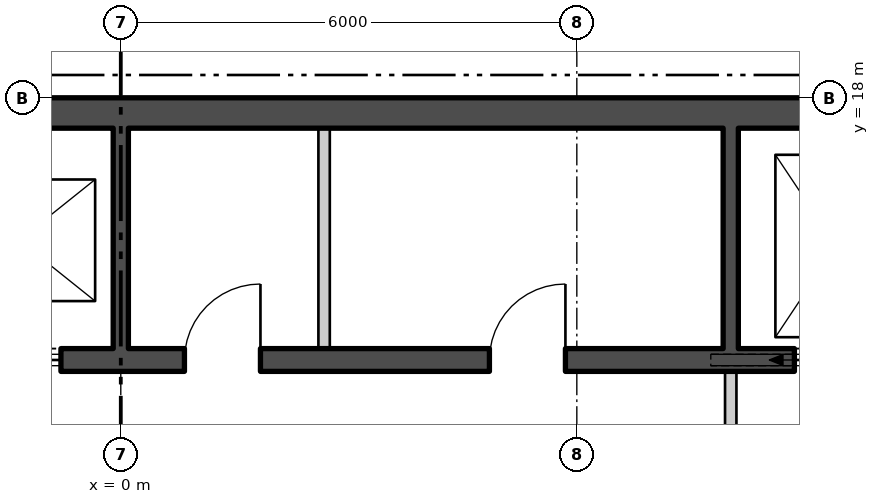
"""IFC4 building model, lengths in metres.
Left out: names, types, materials, properties, quantities, classifications, styles, units other than length and angle.
Written with IfcOpenShell. Run it as: python <this file> out.ifc"""

import sys

from ifc_helpers import new_model, si_unit, direction, frame, frame_2d, origin, place, context, subcontext, project, spatial, polyline, rectangle, outline, extrude, element, fill, save


model = new_model("IFC4")
c1 = context("Model", 3, precision=1e-05, world=origin(), true_north=direction((0.0, 1.0)))
c2 = subcontext(c1, "Body", "Model", "MODEL_VIEW")
j1 = project(units=[si_unit("LENGTHUNIT", "METRE"), si_unit("PLANEANGLEUNIT", "RADIAN")], contexts=[c1])
p1 = place(None, origin())
s1 = spatial("IfcSite", under=j1, at=p1, CompositionType="ELEMENT")
p2 = place(p1, origin())
s2 = spatial("IfcBuilding", under=s1, at=p2, CompositionType="ELEMENT")
p3 = place(p2, frame((0.0, 0.0, 257.1)))
s3 = spatial("IfcBuildingStorey", under=s2, at=p3, CompositionType="ELEMENT", Elevation=257.1)
p4 = place(p3, frame((2.825, -24.522, -0.18), z_axis=(0.0, 0.0, 1.0), x_axis=(0.500000141277, 0.866025322218, 0.0)))
e1 = element("IfcWall", 1, at=p4, inside=s3, PredefinedType="SOLIDWALL", context=c2, shape_type="SweptSolid", body=[
    extrude(outline(polyline([(-0.13, -0.225), (45.86, -0.225), (45.6, 0.225), (0.13, 0.225), (-0.13, -0.225)])), origin(), (0.0, 0.0, 1.0), 3.68),
])
p5 = place(p4, frame((1.424, 0.0, 1.08)))
e2 = element("IfcOpeningElement", 2, at=p5, cuts=e1, PredefinedType="OPENING", context=c2, shape_type="SweptSolid", body=[
    extrude(rectangle(XDim=2.4, YDim=2.0, at=frame_2d((1.2, 1.0))), frame((0.0, 0.235, 0.0), z_axis=(0.0, -1.0, 0.0), x_axis=(1.0, 0.0, 0.0)), (0.0, 0.0, 1.0), 0.47),
])
p6 = place(p4, frame((5.892, 0.0, 1.08)))
e3 = element("IfcOpeningElement", 3, at=p6, cuts=e1, PredefinedType="OPENING", context=c2, shape_type="SweptSolid", body=[
    extrude(rectangle(XDim=2.4, YDim=2.0, at=frame_2d((1.2, 1.0))), frame((0.0, 0.235, 0.0), z_axis=(0.0, -1.0, 0.0), x_axis=(1.0, 0.0, 0.0)), (0.0, 0.0, 1.0), 0.47),
])
p7 = place(p4, frame((10.399, 0.0, 1.08)))
e4 = element("IfcOpeningElement", 4, at=p7, cuts=e1, PredefinedType="OPENING", context=c2, shape_type="SweptSolid", body=[
    extrude(rectangle(XDim=2.4, YDim=2.0, at=frame_2d((1.2, 1.0))), frame((0.0, 0.235, 0.0), z_axis=(0.0, -1.0, 0.0), x_axis=(1.0, 0.0, 0.0)), (0.0, 0.0, 1.0), 0.47),
])
p8 = place(p4, frame((14.905, 0.0, 1.08)))
e5 = element("IfcOpeningElement", 5, at=p8, cuts=e1, PredefinedType="OPENING", context=c2, shape_type="SweptSolid", body=[
    extrude(rectangle(XDim=2.4, YDim=2.0, at=frame_2d((1.2, 1.0))), frame((0.0, 0.235, 0.0), z_axis=(0.0, -1.0, 0.0), x_axis=(1.0, 0.0, 0.0)), (0.0, 0.0, 1.0), 0.47),
])
p9 = place(p4, frame((19.412, 0.0, 1.08)))
e6 = element("IfcOpeningElement", 6, at=p9, cuts=e1, PredefinedType="OPENING", context=c2, shape_type="SweptSolid", body=[
    extrude(rectangle(XDim=2.4, YDim=2.0, at=frame_2d((1.2, 1.0))), frame((0.0, 0.235, 0.0), z_axis=(0.0, -1.0, 0.0), x_axis=(1.0, 0.0, 0.0)), (0.0, 0.0, 1.0), 0.47),
])
p10 = place(p4, frame((28.425, 0.0, 1.08)))
e7 = element("IfcOpeningElement", 7, at=p10, cuts=e1, PredefinedType="OPENING", context=c2, shape_type="SweptSolid", body=[
    extrude(rectangle(XDim=2.4, YDim=2.0, at=frame_2d((1.2, 1.0))), frame((0.0, 0.235, 0.0), z_axis=(0.0, -1.0, 0.0), x_axis=(1.0, 0.0, 0.0)), (0.0, 0.0, 1.0), 0.47),
])
p11 = place(p4, frame((37.438, 0.0, 1.08)))
e8 = element("IfcOpeningElement", 8, at=p11, cuts=e1, PredefinedType="OPENING", context=c2, shape_type="SweptSolid", body=[
    extrude(rectangle(XDim=2.4, YDim=2.0, at=frame_2d((1.2, 1.0))), frame((0.0, 0.235, 0.0), z_axis=(0.0, -1.0, 0.0), x_axis=(1.0, 0.0, 0.0)), (0.0, 0.0, 1.0), 0.47),
])
p12 = place(p4, frame((41.907, 0.0, 1.08)))
e9 = element("IfcOpeningElement", 9, at=p12, cuts=e1, PredefinedType="OPENING", context=c2, shape_type="SweptSolid", body=[
    extrude(rectangle(XDim=2.4, YDim=2.0, at=frame_2d((1.2, 1.0))), frame((0.0, 0.235, 0.0), z_axis=(0.0, -1.0, 0.0), x_axis=(1.0, 0.0, 0.0)), (0.0, 0.0, 1.0), 0.47),
])
p13 = place(p3, frame((-14.5, 17.8, 0.0), z_axis=(0.0, 0.0, 1.0), x_axis=(1.0, 0.0, 0.0)))
e10 = element("IfcWall", 10, at=p13, inside=s3, PredefinedType="SHEAR", context=c2, shape_type="SweptSolid", body=[
    extrude(rectangle(XDim=29.0, YDim=0.4, at=frame_2d((14.5, 0.0))), origin(), (0.0, 0.0, 1.0), 3.7),
])
p14 = place(p3, frame((-10.7, 14.55, 0.0), z_axis=(0.0, 0.0, 1.0), x_axis=(1.0, 0.0, 0.0)))
e11 = element("IfcWall", 11, at=p14, inside=s3, PredefinedType="SHEAR", context=c2, shape_type="SweptSolid", body=[
    extrude(rectangle(XDim=21.4, YDim=0.3, at=frame_2d((10.7, 0.0))), origin(), (0.0, 0.0, 1.0), 3.7),
])
p15 = place(p14, frame((0.738, 0.0, 0.0)))
e12 = element("IfcOpeningElement", 12, at=p15, cuts=e11, PredefinedType="OPENING", context=c2, shape_type="SweptSolid", body=[
    extrude(rectangle(XDim=1.1, YDim=2.1, at=frame_2d((0.55, 1.05))), frame((0.0, 0.16, 0.0), z_axis=(0.0, -1.0, 0.0), x_axis=(1.0, 0.0, 0.0)), (0.0, 0.0, 1.0), 0.32),
])
p16 = place(p14, frame((3.462, 0.0, 0.0)))
e13 = element("IfcOpeningElement", 13, at=p16, cuts=e11, PredefinedType="OPENING", context=c2, shape_type="SweptSolid", body=[
    extrude(rectangle(XDim=1.1, YDim=2.1, at=frame_2d((0.55, 1.05))), frame((0.0, 0.16, 0.0), z_axis=(0.0, -1.0, 0.0), x_axis=(1.0, 0.0, 0.0)), (0.0, 0.0, 1.0), 0.32),
])
p17 = place(p14, frame((6.138, 0.0, 0.0)))
e14 = element("IfcOpeningElement", 14, at=p17, cuts=e11, PredefinedType="OPENING", context=c2, shape_type="SweptSolid", body=[
    extrude(rectangle(XDim=1.1, YDim=2.1, at=frame_2d((0.55, 1.05))), frame((0.0, 0.16, 0.0), z_axis=(0.0, -1.0, 0.0), x_axis=(1.0, 0.0, 0.0)), (0.0, 0.0, 1.0), 0.32),
])
p18 = place(p14, frame((8.812, 0.0, 0.0)))
e15 = element("IfcOpeningElement", 15, at=p18, cuts=e11, PredefinedType="OPENING", context=c2, shape_type="SweptSolid", body=[
    extrude(rectangle(XDim=1.1, YDim=2.1, at=frame_2d((0.55, 1.05))), frame((0.0, 0.16, 0.0), z_axis=(0.0, -1.0, 0.0), x_axis=(1.0, 0.0, 0.0)), (0.0, 0.0, 1.0), 0.32),
])
p19 = place(p14, frame((19.562, 0.0, 0.0)))
e16 = element("IfcOpeningElement", 16, at=p19, cuts=e11, PredefinedType="OPENING", context=c2, shape_type="SweptSolid", body=[
    extrude(rectangle(XDim=1.1, YDim=2.1, at=frame_2d((0.55, 1.05))), frame((0.0, 0.16, 0.0), z_axis=(0.0, -1.0, 0.0), x_axis=(1.0, 0.0, 0.0)), (0.0, 0.0, 1.0), 0.32),
])
p20 = place(p14, frame((11.537, 0.0, 0.0)))
e17 = element("IfcOpeningElement", 17, at=p20, cuts=e11, PredefinedType="OPENING", context=c2, shape_type="SweptSolid", body=[
    extrude(rectangle(XDim=1.0, YDim=2.1, at=frame_2d((0.5, 1.05))), frame((0.0, 0.16, 0.0), z_axis=(0.0, -1.0, 0.0), x_axis=(1.0, 0.0, 0.0)), (0.0, 0.0, 1.0), 0.32),
])
p21 = place(p14, frame((15.55, 0.0, 0.0)))
e18 = element("IfcOpeningElement", 18, at=p21, cuts=e11, PredefinedType="OPENING", context=c2, shape_type="SweptSolid", body=[
    extrude(rectangle(XDim=1.0, YDim=2.1, at=frame_2d((0.5, 1.05))), frame((0.0, 0.16, 0.0), z_axis=(0.0, -1.0, 0.0), x_axis=(1.0, 0.0, 0.0)), (0.0, 0.0, 1.0), 0.32),
])
p22 = place(p3, frame((0.0, 14.7, 0.0), z_axis=(0.0, 0.0, 1.0), x_axis=(0.0, 1.0, 0.0)))
e19 = element("IfcWall", 19, at=p22, inside=s3, PredefinedType="SHEAR", context=c2, shape_type="SweptSolid", body=[
    extrude(rectangle(XDim=2.9, YDim=0.2, at=frame_2d((1.45, 0.0))), origin(), (0.0, 0.0, 1.0), 3.7),
])
p23 = place(p3, frame((2.675, 14.7, 0.0), z_axis=(0.0, 0.0, 1.0), x_axis=(0.0, 1.0, 0.0)))
e20 = element("IfcWall", 20, at=p23, inside=s3, PredefinedType="PARTITIONING", context=c2, shape_type="SweptSolid", body=[
    extrude(rectangle(XDim=2.9, YDim=0.15, at=frame_2d((1.45, 0.0))), origin(), (0.0, 0.0, 1.0), 3.7),
])
p24 = place(p3, frame((8.025, 14.7, 0.0), z_axis=(0.0, 0.0, 1.0), x_axis=(0.0, 1.0, 0.0)))
e21 = element("IfcWall", 21, at=p24, inside=s3, PredefinedType="SHEAR", context=c2, shape_type="SweptSolid", body=[
    extrude(rectangle(XDim=2.9, YDim=0.2, at=frame_2d((1.45, 0.0))), origin(), (0.0, 0.0, 1.0), 3.7),
])
p25 = place(p3, frame((8.025, 10.8, 0.0), z_axis=(0.0, 0.0, 1.0), x_axis=(0.0, 1.0, 0.0)))
e22 = element("IfcWall", 22, at=p25, inside=s3, PredefinedType="PARTITIONING", context=c2, shape_type="SweptSolid", body=[
    extrude(rectangle(XDim=3.6, YDim=0.15, at=frame_2d((1.8, 0.0))), origin(), (0.0, 0.0, 1.0), 3.7),
])
p26 = place(p25, frame((1.175, 0.0, 0.0)))
e23 = element("IfcOpeningElement", 23, at=p26, cuts=e22, PredefinedType="OPENING", context=c2, shape_type="SweptSolid", body=[
    extrude(rectangle(XDim=1.25, YDim=2.1, at=frame_2d((0.625, 1.05))), frame((0.0, 0.085, 0.0), z_axis=(0.0, -1.0, 0.0), x_axis=(1.0, 0.0, 0.0)), (0.0, 0.0, 1.0), 0.17),
])
p27 = place(p18, origin())
e24 = element("IfcDoor", 24, at=p27, inside=s3, OperationType="SLIDING_TO_LEFT", PredefinedType="DOOR", context=c2, shape_type="SweptSolid", body=[
    extrude(rectangle(XDim=1.1, YDim=2.1, at=frame_2d((0.55, 1.05))), frame((0.0, 0.025, 0.0), z_axis=(0.0, -1.0, 0.0), x_axis=(1.0, 0.0, 0.0)), (0.0, 0.0, 1.0), 0.05),
])
fill(e15, e24)
p28 = place(p19, origin())
e25 = element("IfcDoor", 25, at=p28, inside=s3, OperationType="SLIDING_TO_LEFT", PredefinedType="DOOR", context=c2, shape_type="SweptSolid", body=[
    extrude(rectangle(XDim=1.1, YDim=2.1, at=frame_2d((0.55, 1.05))), frame((0.0, 0.025, 0.0), z_axis=(0.0, -1.0, 0.0), x_axis=(1.0, 0.0, 0.0)), (0.0, 0.0, 1.0), 0.05),
])
fill(e16, e25)
p29 = place(p20, origin())
e26 = element("IfcDoor", 26, at=p29, inside=s3, OperationType="SINGLE_SWING_LEFT", PredefinedType="DOOR", context=c2, shape_type="SweptSolid", body=[
    extrude(rectangle(XDim=1.0, YDim=2.1, at=frame_2d((0.5, 1.05))), frame((0.0, 0.025, 0.0), z_axis=(0.0, -1.0, 0.0), x_axis=(1.0, 0.0, 0.0)), (0.0, 0.0, 1.0), 0.05),
])
fill(e17, e26)
p30 = place(p21, origin())
e27 = element("IfcDoor", 27, at=p30, inside=s3, OperationType="SINGLE_SWING_LEFT", PredefinedType="DOOR", context=c2, shape_type="SweptSolid", body=[
    extrude(rectangle(XDim=1.0, YDim=2.1, at=frame_2d((0.5, 1.05))), frame((0.0, 0.025, 0.0), z_axis=(0.0, -1.0, 0.0), x_axis=(1.0, 0.0, 0.0)), (0.0, 0.0, 1.0), 0.05),
])
fill(e18, e27)
save(model, sys.argv[1])
